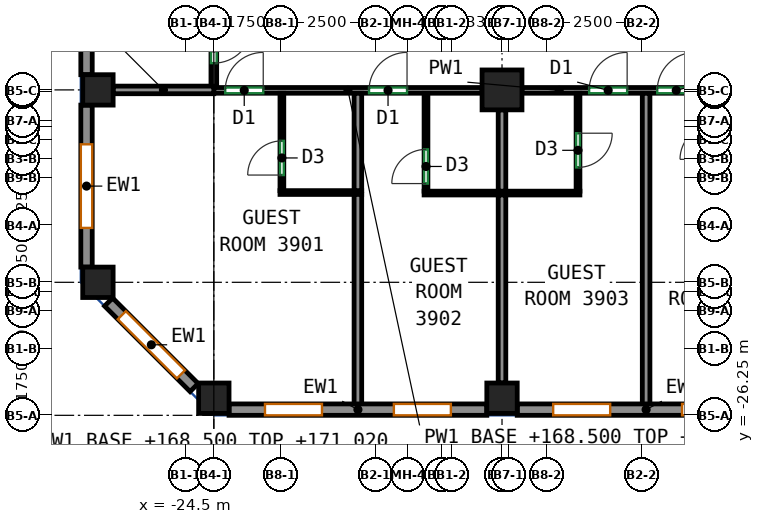
"""IFC4 building model, lengths in metres.
Left out: names, types, materials, properties, quantities, classifications, styles, units other than length and angle.
Written with IfcOpenShell. Run it as: python <this file> out.ifc"""

import sys

from ifc_helpers import new_model, si_unit, direction, frame, frame_2d, origin, origin_2d, place, context, subcontext, project, spatial, rectangle, extrude, source, transform, mapped, element, fill, save


model = new_model("IFC4")
c1 = context("Model", 3, precision=1e-05, world=origin(), true_north=direction((0.0, 1.0)))
c2 = subcontext(c1, "Body", "Model", "MODEL_VIEW")
j1 = project(units=[si_unit("LENGTHUNIT", "METRE"), si_unit("PLANEANGLEUNIT", "RADIAN")], contexts=[c1])
p1 = place(None, origin())
s1 = spatial("IfcSite", under=j1, at=p1, CompositionType="ELEMENT")
p2 = place(p1, origin())
s2 = spatial("IfcBuilding", under=s1, at=p2, CompositionType="ELEMENT")
p3 = place(p2, frame((0.0, 0.0, 168.5)))
s3 = spatial("IfcBuildingStorey", under=s2, at=p3, CompositionType="ELEMENT", Elevation=168.5)
m1 = source(origin(), c2, "Body", "SweptSolid", [
    extrude(rectangle(XDim=0.8, YDim=0.8, at=origin_2d()), origin(), (0.0, 0.0, 1.0), 3.12),
])
for number, where, z_axis, x_axis in (
    (1, (-26.8, -22.75, 0.0), (0.0, 0.0, 1.0), (1.0, 0.0, 0.0)),
    (2, (-26.8, -17.688, 0.0), (0.0, 0.0, 1.0), (1.0, 0.0, 0.0)),
    (3, (-23.75, -25.8, 0.0), (0.0, 0.0, 1.0), (1.0, 0.0, 0.0)),
    (4, (-16.167, -25.8, 0.0), (0.0, 0.0, 1.0), (1.0, 0.0, 0.0)),
):
    element("IfcColumn", number, at=place(p3, frame(where, z_axis=z_axis, x_axis=x_axis)), inside=s3, PredefinedType="COLUMN", context=c2, shape_type="MappedRepresentation", body=[
        mapped(m1, transform((0.0, 0.0, 0.0))),
    ])
m2 = source(origin(), c2, "Body", "SweptSolid", [
    extrude(rectangle(XDim=1.05, YDim=1.05, at=origin_2d()), origin(), (0.0, 0.0, 1.0), 3.12),
])
p4 = place(p3, frame((-16.167, -17.688, 0.0), z_axis=(0.0, 0.0, 1.0), x_axis=(1.0, 0.0, 0.0)))
e5 = element("IfcColumn", 5, at=p4, inside=s3, PredefinedType="COLUMN", context=c2, shape_type="MappedRepresentation", body=[
    mapped(m2, transform((0.0, 0.0, 0.0))),
])
m3 = source(origin(), c2, "Body", "SweptSolid", [
    extrude(rectangle(XDim=6.783, YDim=0.3, at=frame_2d((3.392, 0.0))), origin(), (0.0, 0.0, 1.0), 3.12),
])
p5 = place(p3, frame((-23.35, -26.1, 0.0), z_axis=(0.0, 0.0, 1.0), x_axis=(1.0, 0.0, 0.0)))
e6 = element("IfcWall", 6, at=p5, inside=s3, PredefinedType="SOLIDWALL", context=c2, shape_type="MappedRepresentation", body=[
    mapped(m3, transform((0.0, 0.0, 0.0))),
])
p6 = place(p5, frame((0.946, 0.0, 0.85)))
e7 = element("IfcOpeningElement", 7, at=p6, cuts=e6, PredefinedType="OPENING", context=c2, shape_type="SweptSolid", body=[
    extrude(rectangle(XDim=1.5, YDim=1.95, at=frame_2d((0.75, 0.975))), frame((0.0, 0.16, 0.0), z_axis=(0.0, -1.0, 0.0), x_axis=(1.0, 0.0, 0.0)), (0.0, 0.0, 1.0), 0.32),
])
p7 = place(p5, frame((4.337, 0.0, 0.85)))
e8 = element("IfcOpeningElement", 8, at=p7, cuts=e6, PredefinedType="OPENING", context=c2, shape_type="SweptSolid", body=[
    extrude(rectangle(XDim=1.5, YDim=1.95, at=frame_2d((0.75, 0.975))), frame((0.0, 0.16, 0.0), z_axis=(0.0, -1.0, 0.0), x_axis=(1.0, 0.0, 0.0)), (0.0, 0.0, 1.0), 0.32),
])
m4 = source(origin(), c2, "Body", "SweptSolid", [
    extrude(rectangle(XDim=6.783, YDim=0.3, at=frame_2d((3.392, 0.0))), origin(), (0.0, 0.0, 1.0), 3.12),
])
p8 = place(p3, frame((-15.767, -26.1, 0.0), z_axis=(0.0, 0.0, 1.0), x_axis=(1.0, 0.0, 0.0)))
e9 = element("IfcWall", 9, at=p8, inside=s3, PredefinedType="SOLIDWALL", context=c2, shape_type="MappedRepresentation", body=[
    mapped(m4, transform((0.0, 0.0, 0.0))),
])
p9 = place(p8, frame((0.946, 0.0, 0.85)))
e10 = element("IfcOpeningElement", 10, at=p9, cuts=e9, PredefinedType="OPENING", context=c2, shape_type="SweptSolid", body=[
    extrude(rectangle(XDim=1.5, YDim=1.95, at=frame_2d((0.75, 0.975))), frame((0.0, 0.16, 0.0), z_axis=(0.0, -1.0, 0.0), x_axis=(1.0, 0.0, 0.0)), (0.0, 0.0, 1.0), 0.32),
])
p10 = place(p8, frame((4.338, 0.0, 0.85)))
e11 = element("IfcOpeningElement", 11, at=p10, cuts=e9, PredefinedType="OPENING", context=c2, shape_type="SweptSolid", body=[
    extrude(rectangle(XDim=1.5, YDim=1.95, at=frame_2d((0.75, 0.975))), frame((0.0, 0.16, 0.0), z_axis=(0.0, -1.0, 0.0), x_axis=(1.0, 0.0, 0.0)), (0.0, 0.0, 1.0), 0.32),
])
m5 = source(origin(), c2, "Body", "SweptSolid", [
    extrude(rectangle(XDim=7.763, YDim=0.3, at=frame_2d((3.881, 0.0))), origin(), (0.0, 0.0, 1.0), 3.12),
])
p11 = place(p3, frame((-27.1, -9.525, 0.0), z_axis=(0.0, 0.0, 1.0), x_axis=(0.0, -1.0, 0.0)))
e12 = element("IfcWall", 12, at=p11, inside=s3, PredefinedType="SOLIDWALL", context=c2, shape_type="MappedRepresentation", body=[
    mapped(m5, transform((0.0, 0.0, 0.0))),
])
p12 = place(p11, frame((0.841, 0.0, 0.85)))
e13 = element("IfcOpeningElement", 13, at=p12, cuts=e12, PredefinedType="OPENING", context=c2, shape_type="SweptSolid", body=[
    extrude(rectangle(XDim=2.2, YDim=1.95, at=frame_2d((1.1, 0.975))), frame((0.0, 0.16, 0.0), z_axis=(0.0, -1.0, 0.0), x_axis=(1.0, 0.0, 0.0)), (0.0, 0.0, 1.0), 0.32),
])
p13 = place(p11, frame((4.722, 0.0, 0.85)))
e14 = element("IfcOpeningElement", 14, at=p13, cuts=e12, PredefinedType="OPENING", context=c2, shape_type="SweptSolid", body=[
    extrude(rectangle(XDim=2.2, YDim=1.95, at=frame_2d((1.1, 0.975))), frame((0.0, 0.16, 0.0), z_axis=(0.0, -1.0, 0.0), x_axis=(1.0, 0.0, 0.0)), (0.0, 0.0, 1.0), 0.32),
])
m6 = source(origin(), c2, "Body", "SweptSolid", [
    extrude(rectangle(XDim=4.263, YDim=0.3, at=frame_2d((2.131, 0.0))), origin(), (0.0, 0.0, 1.0), 3.12),
])
p14 = place(p3, frame((-27.1, -18.087, 0.0), z_axis=(0.0, 0.0, 1.0), x_axis=(0.0, -1.0, 0.0)))
e15 = element("IfcWall", 15, at=p14, inside=s3, PredefinedType="SOLIDWALL", context=c2, shape_type="MappedRepresentation", body=[
    mapped(m6, transform((0.0, 0.0, 0.0))),
])
p15 = place(p14, frame((1.031, 0.0, 0.85)))
e16 = element("IfcOpeningElement", 16, at=p15, cuts=e15, PredefinedType="OPENING", context=c2, shape_type="SweptSolid", body=[
    extrude(rectangle(XDim=2.2, YDim=1.95, at=frame_2d((1.1, 0.975))), frame((0.0, 0.16, 0.0), z_axis=(0.0, -1.0, 0.0), x_axis=(1.0, 0.0, 0.0)), (0.0, 0.0, 1.0), 0.32),
])
m7 = source(origin(), c2, "Body", "SweptSolid", [
    extrude(rectangle(XDim=3.182, YDim=0.3, at=frame_2d((1.591, 0.0))), origin(), (0.0, 0.0, 1.0), 3.12),
])
p16 = place(p3, frame((-26.519, -23.269, 0.0), z_axis=(0.0, 0.0, 1.0), x_axis=(0.707068419229, -0.707145141063, 0.0)))
e17 = element("IfcWall", 17, at=p16, inside=s3, PredefinedType="SOLIDWALL", context=c2, shape_type="MappedRepresentation", body=[
    mapped(m7, transform((0.0, 0.0, 0.0))),
])
p17 = place(p16, frame((0.491, 0.0, 0.85)))
e18 = element("IfcOpeningElement", 18, at=p17, cuts=e17, PredefinedType="OPENING", context=c2, shape_type="SweptSolid", body=[
    extrude(rectangle(XDim=2.2, YDim=1.95, at=frame_2d((1.1, 0.975))), frame((0.0, 0.16, 0.0), z_axis=(0.0, -1.0, 0.0), x_axis=(1.0, 0.0, 0.0)), (0.0, 0.0, 1.0), 0.32),
])
p18 = place(p3, frame((-23.75, -17.7, 0.0), z_axis=(0.0, 0.0, 1.0), x_axis=(1.0, 0.0, 0.0)))
e19 = element("IfcWall", 19, at=p18, inside=s3, PredefinedType="PARTITIONING", context=c2, shape_type="SweptSolid", body=[
    extrude(rectangle(XDim=7.058, YDim=0.15, at=frame_2d((3.529, 0.0))), origin(), (0.0, 0.0, 1.0), 2.52),
])
p19 = place(p18, frame((0.3, 0.0, 0.0)))
e20 = element("IfcOpeningElement", 20, at=p19, cuts=e19, PredefinedType="OPENING", context=c2, shape_type="SweptSolid", body=[
    extrude(rectangle(XDim=1.0, YDim=2.1, at=frame_2d((0.5, 1.05))), frame((0.0, 0.085, 0.0), z_axis=(0.0, -1.0, 0.0), x_axis=(1.0, 0.0, 0.0)), (0.0, 0.0, 1.0), 0.17),
])
p20 = place(p18, frame((4.084, 0.0, 0.0)))
e21 = element("IfcOpeningElement", 21, at=p20, cuts=e19, PredefinedType="OPENING", context=c2, shape_type="SweptSolid", body=[
    extrude(rectangle(XDim=1.0, YDim=2.1, at=frame_2d((0.5, 1.05))), frame((0.0, 0.085, 0.0), z_axis=(0.0, -1.0, 0.0), x_axis=(1.0, 0.0, 0.0)), (0.0, 0.0, 1.0), 0.17),
])
p21 = place(p3, frame((-15.642, -17.7, 0.0), z_axis=(0.0, 0.0, 1.0), x_axis=(1.0, 0.0, 0.0)))
e22 = element("IfcWall", 22, at=p21, inside=s3, PredefinedType="PARTITIONING", context=c2, shape_type="SweptSolid", body=[
    extrude(rectangle(XDim=6.534, YDim=0.15, at=frame_2d((3.267, 0.0))), origin(), (0.0, 0.0, 1.0), 3.12),
])
p22 = place(p21, frame((1.768, 0.0, 0.0)))
e23 = element("IfcOpeningElement", 23, at=p22, cuts=e22, PredefinedType="OPENING", context=c2, shape_type="SweptSolid", body=[
    extrude(rectangle(XDim=1.0, YDim=2.1, at=frame_2d((0.5, 1.05))), frame((0.0, 0.085, 0.0), z_axis=(0.0, -1.0, 0.0), x_axis=(1.0, 0.0, 0.0)), (0.0, 0.0, 1.0), 0.17),
])
p23 = place(p21, frame((3.56, 0.0, 0.0)))
e24 = element("IfcOpeningElement", 24, at=p23, cuts=e22, PredefinedType="OPENING", context=c2, shape_type="SweptSolid", body=[
    extrude(rectangle(XDim=1.0, YDim=2.1, at=frame_2d((0.5, 1.05))), frame((0.0, 0.085, 0.0), z_axis=(0.0, -1.0, 0.0), x_axis=(1.0, 0.0, 0.0)), (0.0, 0.0, 1.0), 0.17),
])
p24 = place(p3, frame((-23.75, -15.575, 0.0), z_axis=(0.0, 0.0, 1.0), x_axis=(0.0, -1.0, 0.0)))
e25 = element("IfcWall", 25, at=p24, inside=s3, PredefinedType="PARTITIONING", context=c2, shape_type="SweptSolid", body=[
    extrude(rectangle(XDim=2.023, YDim=0.15, at=frame_2d((1.011, 0.0))), origin(), (0.0, 0.0, 1.0), 2.52),
])
p25 = place(p24, frame((0.408, 0.0, 0.0)))
e26 = element("IfcOpeningElement", 26, at=p25, cuts=e25, PredefinedType="OPENING", context=c2, shape_type="SweptSolid", body=[
    extrude(rectangle(XDim=1.0, YDim=2.1, at=frame_2d((0.5, 1.05))), frame((0.0, 0.085, 0.0), z_axis=(0.0, -1.0, 0.0), x_axis=(1.0, 0.0, 0.0)), (0.0, 0.0, 1.0), 0.17),
])
p26 = place(p3, frame((-21.959, -20.338, 0.0), z_axis=(0.0, 0.0, 1.0), x_axis=(0.0, 1.0, 0.0)))
e27 = element("IfcWall", 27, at=p26, inside=s3, PredefinedType="PARTITIONING", context=c2, shape_type="SweptSolid", body=[
    extrude(rectangle(XDim=2.561, YDim=0.1, at=frame_2d((1.28, 0.0))), origin(), (0.0, 0.0, 1.0), 3.12),
])
p27 = place(p26, frame((0.41, 0.0, 0.0)))
e28 = element("IfcOpeningElement", 28, at=p27, cuts=e27, PredefinedType="OPENING", context=c2, shape_type="SweptSolid", body=[
    extrude(rectangle(XDim=0.9, YDim=2.1, at=frame_2d((0.45, 1.05))), frame((0.0, 0.06, 0.0), z_axis=(0.0, -1.0, 0.0), x_axis=(1.0, 0.0, 0.0)), (0.0, 0.0, 1.0), 0.12),
])
p28 = place(p3, frame((-22.009, -20.388, 0.0), z_axis=(0.0, 0.0, 1.0), x_axis=(1.0, 0.0, 0.0)))
e29 = element("IfcWall", 29, at=p28, inside=s3, PredefinedType="PARTITIONING", context=c2, shape_type="SweptSolid", body=[
    extrude(rectangle(XDim=2.15, YDim=0.1, at=frame_2d((1.075, 0.0))), origin(), (0.0, 0.0, 1.0), 3.12),
])
p29 = place(p3, frame((-19.959, -26.0, 0.0), z_axis=(0.0, 0.0, 1.0), x_axis=(0.0, 1.0, 0.0)))
e30 = element("IfcWall", 30, at=p29, inside=s3, PredefinedType="PARTITIONING", context=c2, shape_type="SweptSolid", body=[
    extrude(rectangle(XDim=5.562, YDim=0.2, at=frame_2d((2.781, 0.0))), origin(), (0.0, 0.0, 1.0), 3.12),
])
p30 = place(p3, frame((-26.4, -17.688, 0.0), z_axis=(0.0, 0.0, 1.0), x_axis=(1.0, 0.0, 0.0)))
e31 = element("IfcWall", 31, at=p30, inside=s3, PredefinedType="PARTITIONING", context=c2, shape_type="SweptSolid", body=[
    extrude(rectangle(XDim=2.648, YDim=0.2, at=frame_2d((1.324, 0.0))), origin(), (0.0, 0.0, 1.0), 2.52),
])
p31 = place(p3, frame((-19.959, -20.338, 0.0), z_axis=(0.0, 0.0, 1.0), x_axis=(0.0, 1.0, 0.0)))
e32 = element("IfcWall", 32, at=p31, inside=s3, PredefinedType="PARTITIONING", context=c2, shape_type="SweptSolid", body=[
    extrude(rectangle(XDim=2.561, YDim=0.2, at=frame_2d((1.28, 0.0))), origin(), (0.0, 0.0, 1.0), 3.12),
])
p32 = place(p3, frame((-18.167, -20.352, 0.0), z_axis=(0.0, 0.0, 1.0), x_axis=(0.0, 1.0, 0.0)))
e33 = element("IfcWall", 33, at=p32, inside=s3, PredefinedType="PARTITIONING", context=c2, shape_type="SweptSolid", body=[
    extrude(rectangle(XDim=2.575, YDim=0.1, at=frame_2d((1.288, 0.0))), origin(), (0.0, 0.0, 1.0), 3.12),
])
p33 = place(p32, frame((0.2, 0.0, 0.0)))
e34 = element("IfcOpeningElement", 34, at=p33, cuts=e33, PredefinedType="OPENING", context=c2, shape_type="SweptSolid", body=[
    extrude(rectangle(XDim=0.9, YDim=2.1, at=frame_2d((0.45, 1.05))), frame((0.0, 0.06, 0.0), z_axis=(0.0, -1.0, 0.0), x_axis=(1.0, 0.0, 0.0)), (0.0, 0.0, 1.0), 0.12),
])
p34 = place(p3, frame((-18.217, -20.402, 0.0), z_axis=(0.0, 0.0, 1.0), x_axis=(1.0, 0.0, 0.0)))
e35 = element("IfcWall", 35, at=p34, inside=s3, PredefinedType="PARTITIONING", context=c2, shape_type="SweptSolid", body=[
    extrude(rectangle(XDim=4.1, YDim=0.1, at=frame_2d((2.05, 0.0))), origin(), (0.0, 0.0, 1.0), 3.12),
])
p35 = place(p3, frame((-16.167, -25.4, 0.0), z_axis=(0.0, 0.0, 1.0), x_axis=(0.0, 1.0, 0.0)))
e36 = element("IfcWall", 36, at=p35, inside=s3, PredefinedType="PARTITIONING", context=c2, shape_type="SweptSolid", body=[
    extrude(rectangle(XDim=4.948, YDim=0.2, at=frame_2d((2.474, 0.0))), origin(), (0.0, 0.0, 1.0), 3.12),
])
p36 = place(p3, frame((-16.167, -20.352, 0.0), z_axis=(0.0, 0.0, 1.0), x_axis=(0.0, 1.0, 0.0)))
e37 = element("IfcWall", 37, at=p36, inside=s3, PredefinedType="PARTITIONING", context=c2, shape_type="SweptSolid", body=[
    extrude(rectangle(XDim=2.14, YDim=0.2, at=frame_2d((1.07, 0.0))), origin(), (0.0, 0.0, 1.0), 3.12),
])
p37 = place(p3, frame((-14.167, -17.777, 0.0), z_axis=(0.0, 0.0, 1.0), x_axis=(0.0, -1.0, 0.0)))
e38 = element("IfcWall", 38, at=p37, inside=s3, PredefinedType="PARTITIONING", context=c2, shape_type="SweptSolid", body=[
    extrude(rectangle(XDim=2.575, YDim=0.1, at=frame_2d((1.288, 0.0))), origin(), (0.0, 0.0, 1.0), 3.12),
])
p38 = place(p37, frame((1.05, 0.0, 0.0)))
e39 = element("IfcOpeningElement", 39, at=p38, cuts=e38, PredefinedType="OPENING", context=c2, shape_type="SweptSolid", body=[
    extrude(rectangle(XDim=0.9, YDim=2.1, at=frame_2d((0.45, 1.05))), frame((0.0, 0.06, 0.0), z_axis=(0.0, -1.0, 0.0), x_axis=(1.0, 0.0, 0.0)), (0.0, 0.0, 1.0), 0.12),
])
p39 = place(p3, frame((-12.375, -26.0, 0.0), z_axis=(0.0, 0.0, 1.0), x_axis=(0.0, 1.0, 0.0)))
e40 = element("IfcWall", 40, at=p39, inside=s3, PredefinedType="PARTITIONING", context=c2, shape_type="SweptSolid", body=[
    extrude(rectangle(XDim=8.223, YDim=0.2, at=frame_2d((4.111, 0.0))), origin(), (0.0, 0.0, 1.0), 3.12),
])
p40 = place(p6, origin())
e41 = element("IfcWindow", 41, at=p40, inside=s3, PartitioningType="SINGLE_PANEL", PredefinedType="WINDOW", context=c2, shape_type="SweptSolid", body=[
    extrude(rectangle(XDim=1.5, YDim=1.95, at=frame_2d((0.75, 0.975))), frame((0.0, 0.03, 0.0), z_axis=(0.0, -1.0, 0.0), x_axis=(1.0, 0.0, 0.0)), (0.0, 0.0, 1.0), 0.06),
])
fill(e7, e41)
p41 = place(p7, origin())
e42 = element("IfcWindow", 42, at=p41, inside=s3, PartitioningType="SINGLE_PANEL", PredefinedType="WINDOW", context=c2, shape_type="SweptSolid", body=[
    extrude(rectangle(XDim=1.5, YDim=1.95, at=frame_2d((0.75, 0.975))), frame((0.0, 0.03, 0.0), z_axis=(0.0, -1.0, 0.0), x_axis=(1.0, 0.0, 0.0)), (0.0, 0.0, 1.0), 0.06),
])
fill(e8, e42)
p42 = place(p9, origin())
e43 = element("IfcWindow", 43, at=p42, inside=s3, PartitioningType="SINGLE_PANEL", PredefinedType="WINDOW", context=c2, shape_type="SweptSolid", body=[
    extrude(rectangle(XDim=1.5, YDim=1.95, at=frame_2d((0.75, 0.975))), frame((0.0, 0.03, 0.0), z_axis=(0.0, -1.0, 0.0), x_axis=(1.0, 0.0, 0.0)), (0.0, 0.0, 1.0), 0.06),
])
fill(e10, e43)
p43 = place(p10, origin())
e44 = element("IfcWindow", 44, at=p43, inside=s3, PartitioningType="SINGLE_PANEL", PredefinedType="WINDOW", context=c2, shape_type="SweptSolid", body=[
    extrude(rectangle(XDim=1.5, YDim=1.95, at=frame_2d((0.75, 0.975))), frame((0.0, 0.03, 0.0), z_axis=(0.0, -1.0, 0.0), x_axis=(1.0, 0.0, 0.0)), (0.0, 0.0, 1.0), 0.06),
])
fill(e11, e44)
p44 = place(p15, origin())
e45 = element("IfcWindow", 45, at=p44, inside=s3, PartitioningType="SINGLE_PANEL", PredefinedType="WINDOW", context=c2, shape_type="SweptSolid", body=[
    extrude(rectangle(XDim=2.2, YDim=1.95, at=frame_2d((1.1, 0.975))), frame((0.0, 0.03, 0.0), z_axis=(0.0, -1.0, 0.0), x_axis=(1.0, 0.0, 0.0)), (0.0, 0.0, 1.0), 0.06),
])
fill(e16, e45)
p45 = place(p17, origin())
e46 = element("IfcWindow", 46, at=p45, inside=s3, PartitioningType="SINGLE_PANEL", PredefinedType="WINDOW", context=c2, shape_type="SweptSolid", body=[
    extrude(rectangle(XDim=2.2, YDim=1.95, at=frame_2d((1.1, 0.975))), frame((0.0, 0.03, 0.0), z_axis=(0.0, -1.0, 0.0), x_axis=(1.0, 0.0, 0.0)), (0.0, 0.0, 1.0), 0.06),
])
fill(e18, e46)
p46 = place(p33, origin())
e47 = element("IfcDoor", 47, at=p46, inside=s3, OperationType="SINGLE_SWING_LEFT", PredefinedType="DOOR", context=c2, shape_type="SweptSolid", body=[
    extrude(rectangle(XDim=0.9, YDim=2.1, at=frame_2d((0.45, 1.05))), frame((0.0, 0.025, 0.0), z_axis=(0.0, -1.0, 0.0), x_axis=(1.0, 0.0, 0.0)), (0.0, 0.0, 1.0), 0.05),
])
fill(e34, e47)
p47 = place(p27, origin())
e48 = element("IfcDoor", 48, at=p47, inside=s3, OperationType="SINGLE_SWING_LEFT", PredefinedType="DOOR", context=c2, shape_type="SweptSolid", body=[
    extrude(rectangle(XDim=0.9, YDim=2.1, at=frame_2d((0.45, 1.05))), frame((0.0, 0.025, 0.0), z_axis=(0.0, -1.0, 0.0), x_axis=(1.0, 0.0, 0.0)), (0.0, 0.0, 1.0), 0.05),
])
fill(e28, e48)
p48 = place(p38, origin())
e49 = element("IfcDoor", 49, at=p48, inside=s3, OperationType="SINGLE_SWING_LEFT", PredefinedType="DOOR", context=c2, shape_type="SweptSolid", body=[
    extrude(rectangle(XDim=0.9, YDim=2.1, at=frame_2d((0.45, 1.05))), frame((0.0, 0.025, 0.0), z_axis=(0.0, -1.0, 0.0), x_axis=(1.0, 0.0, 0.0)), (0.0, 0.0, 1.0), 0.05),
])
fill(e39, e49)
p49 = place(p19, origin())
e50 = element("IfcDoor", 50, at=p49, inside=s3, OperationType="SINGLE_SWING_RIGHT", PredefinedType="DOOR", context=c2, shape_type="SweptSolid", body=[
    extrude(rectangle(XDim=1.0, YDim=2.1, at=frame_2d((0.5, 1.05))), frame((0.0, 0.025, 0.0), z_axis=(0.0, -1.0, 0.0), x_axis=(1.0, 0.0, 0.0)), (0.0, 0.0, 1.0), 0.05),
])
fill(e20, e50)
p50 = place(p20, origin())
e51 = element("IfcDoor", 51, at=p50, inside=s3, OperationType="SINGLE_SWING_RIGHT", PredefinedType="DOOR", context=c2, shape_type="SweptSolid", body=[
    extrude(rectangle(XDim=1.0, YDim=2.1, at=frame_2d((0.5, 1.05))), frame((0.0, 0.025, 0.0), z_axis=(0.0, -1.0, 0.0), x_axis=(1.0, 0.0, 0.0)), (0.0, 0.0, 1.0), 0.05),
])
fill(e21, e51)
p51 = place(p22, origin())
e52 = element("IfcDoor", 52, at=p51, inside=s3, OperationType="SINGLE_SWING_RIGHT", PredefinedType="DOOR", context=c2, shape_type="SweptSolid", body=[
    extrude(rectangle(XDim=1.0, YDim=2.1, at=frame_2d((0.5, 1.05))), frame((0.0, 0.025, 0.0), z_axis=(0.0, -1.0, 0.0), x_axis=(1.0, 0.0, 0.0)), (0.0, 0.0, 1.0), 0.05),
])
fill(e23, e52)
p52 = place(p23, origin())
e53 = element("IfcDoor", 53, at=p52, inside=s3, OperationType="SINGLE_SWING_RIGHT", PredefinedType="DOOR", context=c2, shape_type="SweptSolid", body=[
    extrude(rectangle(XDim=1.0, YDim=2.1, at=frame_2d((0.5, 1.05))), frame((0.0, 0.025, 0.0), z_axis=(0.0, -1.0, 0.0), x_axis=(1.0, 0.0, 0.0)), (0.0, 0.0, 1.0), 0.05),
])
fill(e24, e53)
p53 = place(p25, origin())
e54 = element("IfcDoor", 54, at=p53, inside=s3, OperationType="SINGLE_SWING_LEFT", PredefinedType="DOOR", context=c2, shape_type="SweptSolid", body=[
    extrude(rectangle(XDim=1.0, YDim=2.1, at=frame_2d((0.5, 1.05))), frame((0.0, 0.025, 0.0), z_axis=(0.0, -1.0, 0.0), x_axis=(1.0, 0.0, 0.0)), (0.0, 0.0, 1.0), 0.05),
])
fill(e26, e54)
save(model, sys.argv[1])
